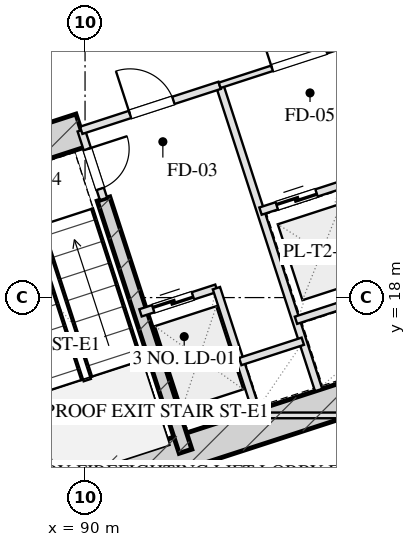
"""IFC4 building model, lengths in metres.
Left out: names, types, materials, properties, quantities, classifications, styles, units other than length and angle.
Written with IfcOpenShell. Run it as: python <this file> out.ifc"""

import sys

from ifc_helpers import new_model, si_unit, direction, frame, frame_2d, origin, place, context, subcontext, project, spatial, rectangle, extrude, element, fill, save


model = new_model("IFC4")
c1 = context("Model", 3, precision=1e-05, world=origin(), true_north=direction((0.0, 1.0)))
c2 = subcontext(c1, "Body", "Model", "MODEL_VIEW")
j1 = project(units=[si_unit("LENGTHUNIT", "METRE"), si_unit("PLANEANGLEUNIT", "RADIAN")], contexts=[c1])
p1 = place(None, origin())
s1 = spatial("IfcSite", under=j1, at=p1, CompositionType="ELEMENT")
p2 = place(p1, origin())
s2 = spatial("IfcBuilding", under=s1, at=p2, CompositionType="ELEMENT")
p3 = place(p2, frame((0.0, 0.0, 11.5)))
s3 = spatial("IfcBuildingStorey", under=s2, at=p3, CompositionType="ELEMENT", Elevation=11.5)
p4 = place(p3, frame((88.487, 12.605, 0.0), z_axis=(0.0, 0.0, 1.0), x_axis=(0.951055016115, 0.309021611416, 0.0)))
e1 = element("IfcWall", 1, at=p4, inside=s3, PredefinedType="SHEAR", context=c2, shape_type="SweptSolid", body=[
    extrude(rectangle(XDim=16.7, YDim=0.9, at=frame_2d((8.35, 0.0))), origin(), (0.0, 0.0, 1.0), 5.0),
])
p5 = place(p3, frame((86.032, 21.618, 0.0), z_axis=(0.0, 0.0, 1.0), x_axis=(0.30901438634, -0.951057363693, 0.0)))
e2 = element("IfcWall", 2, at=p5, inside=s3, PredefinedType="SHEAR", context=c2, shape_type="SweptSolid", body=[
    extrude(rectangle(XDim=9.78, YDim=0.9, at=frame_2d((4.89, 0.0))), origin(), (0.0, 0.0, 1.0), 5.0),
])
p6 = place(p3, frame((90.486, 20.594, 0.0), z_axis=(0.0, 0.0, 1.0), x_axis=(0.309020428229, -0.951055400562, 0.0)))
e3 = element("IfcWall", 3, at=p6, inside=s3, PredefinedType="SHEAR", context=c2, shape_type="SweptSolid", body=[
    extrude(rectangle(XDim=6.98, YDim=0.35, at=frame_2d((3.49, 0.0))), origin(), (0.0, 0.0, 1.0), 5.0),
])
p7 = place(p3, frame((85.743, 21.051, 0.0), z_axis=(0.0, 0.0, 1.0), x_axis=(0.951063623806, 0.308995118848, 0.0)))
e4 = element("IfcWall", 4, at=p7, inside=s3, PredefinedType="SHEAR", context=c2, shape_type="SweptSolid", body=[
    extrude(rectangle(XDim=4.37, YDim=0.9, at=frame_2d((2.185, 0.0))), origin(), (0.0, 0.0, 1.0), 5.0),
])
p8 = place(p3, frame((89.899, 22.401, 0.0), z_axis=(0.0, 0.0, 1.0), x_axis=(0.308932062672, -0.951084108086, 0.0)))
e5 = element("IfcWall", 5, at=p8, inside=s3, PredefinedType="PARTITIONING", context=c2, shape_type="SweptSolid", body=[
    extrude(rectangle(XDim=1.9, YDim=0.2, at=frame_2d((0.95, 0.0))), origin(), (0.0, 0.0, 1.0), 4.685),
])
p9 = place(p8, frame((0.52, 0.0, 0.0)))
e6 = element("IfcOpeningElement", 6, at=p9, cuts=e5, PredefinedType="OPENING", context=c2, shape_type="SweptSolid", body=[
    extrude(rectangle(XDim=1.1, YDim=2.05, at=frame_2d((0.55, 1.025))), frame((0.0, 0.11, 0.0), z_axis=(0.0, -1.0, 0.0), x_axis=(1.0, 0.0, 0.0)), (0.0, 0.0, 1.0), 0.22),
])
p10 = place(p3, frame((93.542, 23.585, 0.0), z_axis=(0.0, 0.0, 1.0), x_axis=(0.309042196757, -0.951048327176, 0.0)))
e7 = element("IfcWall", 7, at=p10, inside=s3, PredefinedType="PARTITIONING", context=c2, shape_type="SweptSolid", body=[
    extrude(rectangle(XDim=8.43, YDim=0.2, at=frame_2d((4.215, 0.0))), origin(), (0.0, 0.0, 1.0), 4.685),
])
p11 = place(p3, frame((89.899, 22.401, 0.0), z_axis=(0.0, 0.0, 1.0), x_axis=(0.951046716504, 0.309047153403, 0.0)))
e8 = element("IfcWall", 8, at=p11, inside=s3, PredefinedType="PARTITIONING", context=c2, shape_type="SweptSolid", body=[
    extrude(rectangle(XDim=3.83, YDim=0.2, at=frame_2d((1.915, 0.0))), origin(), (0.0, 0.0, 1.0), 4.685),
])
p12 = place(p11, frame((1.35, 0.0, 0.0)))
e9 = element("IfcOpeningElement", 9, at=p12, cuts=e8, PredefinedType="OPENING", context=c2, shape_type="SweptSolid", body=[
    extrude(rectangle(XDim=1.2, YDim=2.05, at=frame_2d((0.6, 1.025))), frame((0.0, 0.11, 0.0), z_axis=(0.0, -1.0, 0.0), x_axis=(1.0, 0.0, 0.0)), (0.0, 0.0, 1.0), 0.22),
])
p13 = place(p3, frame((91.46, 17.598, 0.0), z_axis=(0.0, 0.0, 1.0), x_axis=(0.951062257173, 0.308999325213, 0.0)))
e10 = element("IfcWall", 10, at=p13, inside=s3, PredefinedType="PARTITIONING", context=c2, shape_type="SweptSolid", body=[
    extrude(rectangle(XDim=2.1, YDim=0.2, at=frame_2d((1.05, 0.0))), origin(), (0.0, 0.0, 1.0), 4.685),
])
p14 = place(p13, frame((0.35, 0.0, 0.0)))
e11 = element("IfcOpeningElement", 11, at=p14, cuts=e10, PredefinedType="OPENING", context=c2, shape_type="SweptSolid", body=[
    extrude(rectangle(XDim=1.1, YDim=2.05, at=frame_2d((0.55, 1.025))), frame((0.0, 0.11, 0.0), z_axis=(0.0, -1.0, 0.0), x_axis=(1.0, 0.0, 0.0)), (0.0, 0.0, 1.0), 0.22),
])
p15 = place(p3, frame((93.457, 18.247, 0.0), z_axis=(0.0, 0.0, 1.0), x_axis=(0.3089935693, -0.951064127245, 0.0)))
e12 = element("IfcWall", 12, at=p15, inside=s3, PredefinedType="PARTITIONING", context=c2, shape_type="SweptSolid", body=[
    extrude(rectangle(XDim=3.7, YDim=0.2, at=frame_2d((1.85, 0.0))), origin(), (0.0, 0.0, 1.0), 4.685),
])
p16 = place(p3, frame((94.084, 16.317, 0.0), z_axis=(0.0, 0.0, 1.0), x_axis=(0.951041328149, 0.309063734775, 0.0)))
e13 = element("IfcWall", 13, at=p16, inside=s3, PredefinedType="PARTITIONING", context=c2, shape_type="SweptSolid", body=[
    extrude(rectangle(XDim=1.73, YDim=0.2, at=frame_2d((0.865, 0.0))), origin(), (0.0, 0.0, 1.0), 4.685),
])
p17 = place(p3, frame((93.542, 23.585, 0.0), z_axis=(0.0, 0.0, 1.0), x_axis=(0.951063829732, 0.308994485023, 0.0)))
e14 = element("IfcWall", 14, at=p17, inside=s3, PredefinedType="PARTITIONING", context=c2, shape_type="SweptSolid", body=[
    extrude(rectangle(XDim=4.4, YDim=0.15, at=frame_2d((2.2, 0.0))), origin(), (0.0, 0.0, 1.0), 4.685),
])
p18 = place(p17, frame((1.45, 0.0, 0.0)))
e15 = element("IfcOpeningElement", 15, at=p18, cuts=e14, PredefinedType="OPENING", context=c2, shape_type="SweptSolid", body=[
    extrude(rectangle(XDim=1.5, YDim=2.05, at=frame_2d((0.75, 1.025))), frame((0.0, 0.085, 0.0), z_axis=(0.0, -1.0, 0.0), x_axis=(1.0, 0.0, 0.0)), (0.0, 0.0, 1.0), 0.17),
])
p19 = place(p3, frame((94.617, 20.275, 0.0), z_axis=(0.0, 0.0, 1.0), x_axis=(0.951058531764, 0.30901079133, 0.0)))
e16 = element("IfcWall", 16, at=p19, inside=s3, PredefinedType="PARTITIONING", context=c2, shape_type="SweptSolid", body=[
    extrude(rectangle(XDim=4.4, YDim=0.2, at=frame_2d((2.2, 0.0))), origin(), (0.0, 0.0, 1.0), 4.685),
])
p20 = place(p19, frame((0.45, 0.0, 0.0)))
e17 = element("IfcOpeningElement", 17, at=p20, cuts=e16, PredefinedType="OPENING", context=c2, shape_type="SweptSolid", body=[
    extrude(rectangle(XDim=1.1, YDim=2.05, at=frame_2d((0.55, 1.025))), frame((0.0, 0.11, 0.0), z_axis=(0.0, -1.0, 0.0), x_axis=(1.0, 0.0, 0.0)), (0.0, 0.0, 1.0), 0.22),
])
p21 = place(p19, frame((2.55, 0.0, 0.0)))
e18 = element("IfcOpeningElement", 18, at=p21, cuts=e16, PredefinedType="OPENING", context=c2, shape_type="SweptSolid", body=[
    extrude(rectangle(XDim=1.1, YDim=2.05, at=frame_2d((0.55, 1.025))), frame((0.0, 0.11, 0.0), z_axis=(0.0, -1.0, 0.0), x_axis=(1.0, 0.0, 0.0)), (0.0, 0.0, 1.0), 0.22),
])
p22 = place(p3, frame((95.551, 17.403, 0.0), z_axis=(0.0, 0.0, 1.0), x_axis=(0.951058531764, 0.30901079133, 0.0)))
e19 = element("IfcWall", 19, at=p22, inside=s3, PredefinedType="PARTITIONING", context=c2, shape_type="SweptSolid", body=[
    extrude(rectangle(XDim=4.4, YDim=0.2, at=frame_2d((2.2, 0.0))), origin(), (0.0, 0.0, 1.0), 4.685),
])
p23 = place(p3, frame((18.0, 14.9, 0.0), z_axis=(0.0, 0.0, 1.0), x_axis=(1.0, 0.0, 0.0)))
e20 = element("IfcWall", 20, at=p23, inside=s3, PredefinedType="PARTITIONING", context=c2, shape_type="SweptSolid", body=[
    extrude(rectangle(XDim=88.0, YDim=0.15, at=frame_2d((44.0, 0.0))), origin(), (0.0, 0.0, 1.0), 2.15),
])
p24 = place(p23, frame((21.6, 0.0, 0.0)))
e21 = element("IfcOpeningElement", 21, at=p24, cuts=e20, PredefinedType="OPENING", context=c2, shape_type="SweptSolid", body=[
    extrude(rectangle(XDim=1.5, YDim=2.05, at=frame_2d((0.75, 1.025))), frame((0.0, 0.085, 0.0), z_axis=(0.0, -1.0, 0.0), x_axis=(1.0, 0.0, 0.0)), (0.0, 0.0, 1.0), 0.17),
])
p25 = place(p9, origin())
e22 = element("IfcDoor", 22, at=p25, inside=s3, OperationType="SINGLE_SWING_LEFT", PredefinedType="DOOR", context=c2, shape_type="SweptSolid", body=[
    extrude(rectangle(XDim=1.1, YDim=2.05, at=frame_2d((0.55, 1.025))), frame((0.0, 0.025, 0.0), z_axis=(0.0, -1.0, 0.0), x_axis=(1.0, 0.0, 0.0)), (0.0, 0.0, 1.0), 0.05),
])
fill(e6, e22)
p26 = place(p12, origin())
e23 = element("IfcDoor", 23, at=p26, inside=s3, OperationType="SINGLE_SWING_LEFT", PredefinedType="DOOR", context=c2, shape_type="SweptSolid", body=[
    extrude(rectangle(XDim=1.2, YDim=2.05, at=frame_2d((0.6, 1.025))), frame((0.0, 0.025, 0.0), z_axis=(0.0, -1.0, 0.0), x_axis=(1.0, 0.0, 0.0)), (0.0, 0.0, 1.0), 0.05),
])
fill(e9, e23)
p27 = place(p14, origin())
e24 = element("IfcDoor", 24, at=p27, inside=s3, OperationType="DOUBLE_DOOR_SLIDING", PredefinedType="DOOR", context=c2, shape_type="SweptSolid", body=[
    extrude(rectangle(XDim=1.1, YDim=2.05, at=frame_2d((0.55, 1.025))), frame((0.0, 0.025, 0.0), z_axis=(0.0, -1.0, 0.0), x_axis=(1.0, 0.0, 0.0)), (0.0, 0.0, 1.0), 0.05),
])
fill(e11, e24)
p28 = place(p18, origin())
e25 = element("IfcDoor", 25, at=p28, inside=s3, OperationType="SINGLE_SWING_LEFT", PredefinedType="DOOR", context=c2, shape_type="SweptSolid", body=[
    extrude(rectangle(XDim=1.5, YDim=2.05, at=frame_2d((0.75, 1.025))), frame((0.0, 0.025, 0.0), z_axis=(0.0, -1.0, 0.0), x_axis=(1.0, 0.0, 0.0)), (0.0, 0.0, 1.0), 0.05),
])
fill(e15, e25)
p29 = place(p20, origin())
e26 = element("IfcDoor", 26, at=p29, inside=s3, OperationType="DOUBLE_DOOR_SLIDING", PredefinedType="DOOR", context=c2, shape_type="SweptSolid", body=[
    extrude(rectangle(XDim=1.1, YDim=2.05, at=frame_2d((0.55, 1.025))), frame((0.0, 0.025, 0.0), z_axis=(0.0, -1.0, 0.0), x_axis=(1.0, 0.0, 0.0)), (0.0, 0.0, 1.0), 0.05),
])
fill(e17, e26)
save(model, sys.argv[1])
